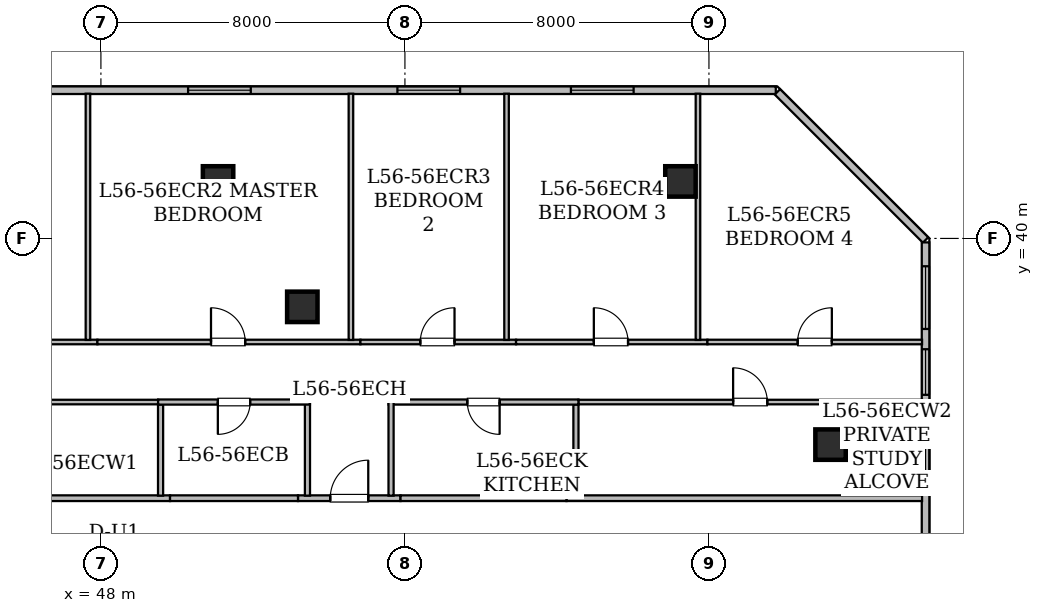
"""IFC4 building model, lengths in metres.
Left out: names, types, materials, properties, quantities, classifications, styles, units other than length and angle.
Written with IfcOpenShell. Run it as: python <this file> out.ifc"""

import sys

from ifc_helpers import new_model, si_unit, direction, frame, frame_2d, origin, origin_2d, place, context, subcontext, project, spatial, rectangle, hollow_rectangle, extrude, element, fill, save


model = new_model("IFC4")
c1 = context("Model", 3, precision=1e-05, world=origin(), true_north=direction((0.0, 1.0)))
c2 = subcontext(c1, "Body", "Model", "MODEL_VIEW")
j1 = project(units=[si_unit("LENGTHUNIT", "METRE"), si_unit("PLANEANGLEUNIT", "RADIAN")], contexts=[c1])
p1 = place(None, origin())
s1 = spatial("IfcSite", under=j1, at=p1, CompositionType="ELEMENT")
p2 = place(p1, origin())
s2 = spatial("IfcBuilding", under=s1, at=p2, CompositionType="ELEMENT")
p3 = place(p2, frame((0.0, 0.0, 220.85)))
s3 = spatial("IfcBuildingStorey", under=s2, at=p3, CompositionType="ELEMENT", Elevation=220.85)
for number, where, z_axis, x_axis in (
    (1, (51.083, 41.5, 0.0), (0.0, 0.0, 1.0), (1.0, 0.0, 0.0)),
    (2, (63.25, 41.5, 0.0), (0.0, 0.0, 1.0), (1.0, 0.0, 0.0)),
    (3, (67.2, 34.575, 0.0), (0.0, 0.0, 1.0), (1.0, 0.0, 0.0)),
    (4, (53.3, 38.2, 0.0), (0.0, 0.0, 1.0), (1.0, 0.0, 0.0)),
):
    element("IfcColumn", number, at=place(p3, frame(where, z_axis=z_axis, x_axis=x_axis)), inside=s3, PredefinedType="COLUMN", context=c2, shape_type="SweptSolid", body=[
        extrude(hollow_rectangle(XDim=0.8, YDim=0.8, WallThickness=0.04, at=origin_2d()), origin(), (0.0, 0.0, 1.0), 3.65),
    ])
p4 = place(p3, frame((24.302, 43.9, 0.0), z_axis=(0.0, 0.0, 1.0), x_axis=(1.0, 0.0, 0.0)))
e5 = element("IfcWall", 5, at=p4, inside=s3, PredefinedType="STANDARD", context=c2, shape_type="SweptSolid", body=[
    extrude(rectangle(XDim=41.457, YDim=0.2, at=frame_2d((20.729, 0.0))), origin(), (0.0, 0.0, 1.0), 3.43),
])
p5 = place(p4, frame((0.584, 0.0, 0.85)))
e6 = element("IfcOpeningElement", 6, at=p5, cuts=e5, PredefinedType="OPENING", context=c2, shape_type="SweptSolid", body=[
    extrude(rectangle(XDim=1.65, YDim=1.55, at=frame_2d((0.825, 0.775))), frame((0.0, 0.11, 0.0), z_axis=(0.0, -1.0, 0.0), x_axis=(1.0, 0.0, 0.0)), (0.0, 0.0, 1.0), 0.22),
])
p6 = place(p4, frame((9.098, 0.0, 0.85)))
e7 = element("IfcOpeningElement", 7, at=p6, cuts=e5, PredefinedType="OPENING", context=c2, shape_type="SweptSolid", body=[
    extrude(rectangle(XDim=1.65, YDim=1.55, at=frame_2d((0.825, 0.775))), frame((0.0, 0.11, 0.0), z_axis=(0.0, -1.0, 0.0), x_axis=(1.0, 0.0, 0.0)), (0.0, 0.0, 1.0), 0.22),
])
p7 = place(p4, frame((14.405, 0.0, 0.85)))
e8 = element("IfcOpeningElement", 8, at=p7, cuts=e5, PredefinedType="OPENING", context=c2, shape_type="SweptSolid", body=[
    extrude(rectangle(XDim=1.65, YDim=1.55, at=frame_2d((0.825, 0.775))), frame((0.0, 0.11, 0.0), z_axis=(0.0, -1.0, 0.0), x_axis=(1.0, 0.0, 0.0)), (0.0, 0.0, 1.0), 0.22),
])
p8 = place(p4, frame((19.51, 0.0, 0.85)))
e9 = element("IfcOpeningElement", 9, at=p8, cuts=e5, PredefinedType="OPENING", context=c2, shape_type="SweptSolid", body=[
    extrude(rectangle(XDim=1.65, YDim=1.55, at=frame_2d((0.825, 0.775))), frame((0.0, 0.11, 0.0), z_axis=(0.0, -1.0, 0.0), x_axis=(1.0, 0.0, 0.0)), (0.0, 0.0, 1.0), 0.22),
])
p9 = place(p4, frame((25.992, 0.0, 0.85)))
e10 = element("IfcOpeningElement", 10, at=p9, cuts=e5, PredefinedType="OPENING", context=c2, shape_type="SweptSolid", body=[
    extrude(rectangle(XDim=1.65, YDim=1.55, at=frame_2d((0.825, 0.775))), frame((0.0, 0.11, 0.0), z_axis=(0.0, -1.0, 0.0), x_axis=(1.0, 0.0, 0.0)), (0.0, 0.0, 1.0), 0.22),
])
p10 = place(p4, frame((31.5, 0.0, 0.85)))
e11 = element("IfcOpeningElement", 11, at=p10, cuts=e5, PredefinedType="OPENING", context=c2, shape_type="SweptSolid", body=[
    extrude(rectangle(XDim=1.65, YDim=1.55, at=frame_2d((0.825, 0.775))), frame((0.0, 0.11, 0.0), z_axis=(0.0, -1.0, 0.0), x_axis=(1.0, 0.0, 0.0)), (0.0, 0.0, 1.0), 0.22),
])
p11 = place(p4, frame((36.066, 0.0, 0.85)))
e12 = element("IfcOpeningElement", 12, at=p11, cuts=e5, PredefinedType="OPENING", context=c2, shape_type="SweptSolid", body=[
    extrude(rectangle(XDim=1.65, YDim=1.55, at=frame_2d((0.825, 0.775))), frame((0.0, 0.11, 0.0), z_axis=(0.0, -1.0, 0.0), x_axis=(1.0, 0.0, 0.0)), (0.0, 0.0, 1.0), 0.22),
])
p12 = place(p3, frame((65.802, 43.857, 0.0), z_axis=(0.0, 0.0, 1.0), x_axis=(0.707106781187, -0.707106781187, 0.0)))
e13 = element("IfcWall", 13, at=p12, inside=s3, PredefinedType="STANDARD", context=c2, shape_type="SweptSolid", body=[
    extrude(rectangle(XDim=5.512, YDim=0.2, at=frame_2d((2.756, 0.0))), origin(), (0.0, 0.0, 1.0), 3.43),
])
p13 = place(p3, frame((69.7, 39.896, 0.0), z_axis=(0.0, 0.0, 1.0), x_axis=(0.0, -1.0, 0.0)))
e14 = element("IfcWall", 14, at=p13, inside=s3, PredefinedType="STANDARD", context=c2, shape_type="SweptSolid", body=[
    extrude(rectangle(XDim=8.863, YDim=0.2, at=frame_2d((4.432, 0.0))), origin(), (0.0, 0.0, 1.0), 3.43),
])
p14 = place(p13, frame((4.641, 0.0, 0.85)))
e15 = element("IfcOpeningElement", 15, at=p14, cuts=e14, PredefinedType="OPENING", context=c2, shape_type="SweptSolid", body=[
    extrude(rectangle(XDim=1.65, YDim=1.55, at=frame_2d((0.825, 0.775))), frame((0.0, 0.11, 0.0), z_axis=(0.0, -1.0, 0.0), x_axis=(1.0, 0.0, 0.0)), (0.0, 0.0, 1.0), 0.22),
])
p15 = place(p13, frame((2.811, 0.0, 0.8)))
e16 = element("IfcOpeningElement", 16, at=p15, cuts=e14, PredefinedType="OPENING", context=c2, shape_type="SweptSolid", body=[
    extrude(rectangle(XDim=1.2, YDim=1.5, at=frame_2d((0.6, 0.75))), frame((0.0, 0.11, 0.0), z_axis=(0.0, -1.0, 0.0), x_axis=(1.0, 0.0, 0.0)), (0.0, 0.0, 1.0), 0.22),
])
p16 = place(p13, frame((0.628, 0.0, 0.85)))
e17 = element("IfcOpeningElement", 17, at=p16, cuts=e14, PredefinedType="OPENING", context=c2, shape_type="SweptSolid", body=[
    extrude(rectangle(XDim=1.65, YDim=1.55, at=frame_2d((0.825, 0.775))), frame((0.0, 0.11, 0.0), z_axis=(0.0, -1.0, 0.0), x_axis=(1.0, 0.0, 0.0)), (0.0, 0.0, 1.0), 0.22),
])
p17 = place(p3, frame((41.55, 33.165, 0.0), z_axis=(0.0, 0.0, 1.0), x_axis=(1.0, 0.0, 0.0)))
e18 = element("IfcWall", 18, at=p17, inside=s3, PredefinedType="STANDARD", context=c2, shape_type="SweptSolid", body=[
    extrude(rectangle(XDim=8.269, YDim=0.15, at=frame_2d((4.135, 0.0))), origin(), (0.0, 0.0, 1.0), 3.065),
])
p18 = place(p3, frame((60.251, 33.165, 0.0), z_axis=(0.0, 0.0, 1.0), x_axis=(1.0, 0.0, 0.0)))
e19 = element("IfcWall", 19, at=p18, inside=s3, PredefinedType="STANDARD", context=c2, shape_type="SweptSolid", body=[
    extrude(rectangle(XDim=9.357, YDim=0.15, at=frame_2d((4.678, 0.0))), origin(), (0.0, 0.0, 1.0), 2.887),
])
p19 = place(p3, frame((53.186, 33.165, 0.0), z_axis=(0.0, 0.0, 1.0), x_axis=(1.0, 0.0, 0.0)))
e20 = element("IfcWall", 20, at=p19, inside=s3, PredefinedType="STANDARD", context=c2, shape_type="SweptSolid", body=[
    extrude(rectangle(XDim=2.698, YDim=0.15, at=frame_2d((1.349, 0.0))), origin(), (0.0, 0.0, 1.0), 2.725),
])
p20 = place(p19, frame((0.849, 0.0, 0.0)))
e21 = element("IfcOpeningElement", 21, at=p20, cuts=e20, PredefinedType="OPENING", context=c2, shape_type="SweptSolid", body=[
    extrude(rectangle(XDim=1.0, YDim=2.15, at=frame_2d((0.5, 1.075))), frame((0.0, 0.085, 0.0), z_axis=(0.0, -1.0, 0.0), x_axis=(1.0, 0.0, 0.0)), (0.0, 0.0, 1.0), 0.17),
])
p21 = place(p3, frame((49.819, 33.165, 0.0), z_axis=(0.0, 0.0, 1.0), x_axis=(1.0, 0.0, 0.0)))
e22 = element("IfcWall", 22, at=p21, inside=s3, PredefinedType="STANDARD", context=c2, shape_type="SweptSolid", body=[
    extrude(rectangle(XDim=3.367, YDim=0.15, at=frame_2d((1.684, 0.0))), origin(), (0.0, 0.0, 1.0), 2.725),
])
p22 = place(p3, frame((55.884, 33.165, 0.0), z_axis=(0.0, 0.0, 1.0), x_axis=(1.0, 0.0, 0.0)))
e23 = element("IfcWall", 23, at=p22, inside=s3, PredefinedType="STANDARD", context=c2, shape_type="SweptSolid", body=[
    extrude(rectangle(XDim=4.367, YDim=0.15, at=frame_2d((2.184, 0.0))), origin(), (0.0, 0.0, 1.0), 3.065),
])
p23 = place(p3, frame((41.682, 35.695, 0.0), z_axis=(0.0, 0.0, 1.0), x_axis=(1.0, 0.0, 0.0)))
e24 = element("IfcWall", 24, at=p23, inside=s3, PredefinedType="PARTITIONING", context=c2, shape_type="SweptSolid", body=[
    extrude(rectangle(XDim=7.823, YDim=0.12, at=frame_2d((3.912, 0.0))), origin(), (0.0, 0.0, 1.0), 3.43),
])
p24 = place(p23, frame((3.462, 0.0, 0.0)))
e25 = element("IfcOpeningElement", 25, at=p24, cuts=e24, PredefinedType="OPENING", context=c2, shape_type="SweptSolid", body=[
    extrude(rectangle(XDim=0.9, YDim=2.1, at=frame_2d((0.45, 1.05))), frame((0.0, 0.07, 0.0), z_axis=(0.0, -1.0, 0.0), x_axis=(1.0, 0.0, 0.0)), (0.0, 0.0, 1.0), 0.14),
])
p25 = place(p3, frame((49.57, 35.63, 0.0), z_axis=(0.0, 0.0, 1.0), x_axis=(0.0, -1.0, 0.0)))
e26 = element("IfcWall", 26, at=p25, inside=s3, PredefinedType="PARTITIONING", context=c2, shape_type="SweptSolid", body=[
    extrude(rectangle(XDim=2.398, YDim=0.135, at=frame_2d((1.199, 0.0))), origin(), (0.0, 0.0, 1.0), 3.065),
])
p26 = place(p3, frame((60.565, 35.695, 0.0), z_axis=(0.0, 0.0, 1.0), x_axis=(1.0, 0.0, 0.0)))
e27 = element("IfcWall", 27, at=p26, inside=s3, PredefinedType="PARTITIONING", context=c2, shape_type="SweptSolid", body=[
    extrude(rectangle(XDim=9.043, YDim=0.12, at=frame_2d((4.521, 0.0))), origin(), (0.0, 0.0, 1.0), 2.725),
])
p27 = place(p26, frame((4.071, 0.0, 0.0)))
e28 = element("IfcOpeningElement", 28, at=p27, cuts=e27, PredefinedType="OPENING", context=c2, shape_type="SweptSolid", body=[
    extrude(rectangle(XDim=0.9, YDim=2.1, at=frame_2d((0.45, 1.05))), frame((0.0, 0.07, 0.0), z_axis=(0.0, -1.0, 0.0), x_axis=(1.0, 0.0, 0.0)), (0.0, 0.0, 1.0), 0.14),
])
p28 = place(p3, frame((60.5, 33.232, 0.0), z_axis=(0.0, 0.0, 1.0), x_axis=(0.0, 1.0, 0.0)))
e29 = element("IfcWall", 29, at=p28, inside=s3, PredefinedType="PARTITIONING", context=c2, shape_type="SweptSolid", body=[
    extrude(rectangle(XDim=2.398, YDim=0.135, at=frame_2d((1.199, 0.0))), origin(), (0.0, 0.0, 1.0), 3.065),
])
p29 = place(p3, frame((53.435, 33.232, 0.0), z_axis=(0.0, 0.0, 1.0), x_axis=(0.0, 1.0, 0.0)))
e30 = element("IfcWall", 30, at=p29, inside=s3, PredefinedType="PARTITIONING", context=c2, shape_type="SweptSolid", body=[
    extrude(rectangle(XDim=2.528, YDim=0.135, at=frame_2d((1.264, 0.0))), origin(), (0.0, 0.0, 1.0), 2.725),
])
p30 = place(p3, frame((53.5, 35.695, 0.0), z_axis=(0.0, 0.0, 1.0), x_axis=(-1.0, 0.0, 0.0)))
e31 = element("IfcWall", 31, at=p30, inside=s3, PredefinedType="PARTITIONING", context=c2, shape_type="SweptSolid", body=[
    extrude(rectangle(XDim=3.995, YDim=0.135, at=frame_2d((1.998, 0.0))), origin(), (0.0, 0.0, 1.0), 2.725),
])
p31 = place(p30, frame((1.573, 0.0, 0.0)))
e32 = element("IfcOpeningElement", 32, at=p31, cuts=e31, PredefinedType="OPENING", context=c2, shape_type="SweptSolid", body=[
    extrude(rectangle(XDim=0.85, YDim=2.1, at=frame_2d((0.425, 1.05))), frame((0.0, 0.077, 0.0), z_axis=(0.0, -1.0, 0.0), x_axis=(1.0, 0.0, 0.0)), (0.0, 0.0, 1.0), 0.155),
])
p32 = place(p3, frame((60.565, 35.695, 0.0), z_axis=(0.0, 0.0, 1.0), x_axis=(-1.0, 0.0, 0.0)))
e33 = element("IfcWall", 33, at=p32, inside=s3, PredefinedType="PARTITIONING", context=c2, shape_type="SweptSolid", body=[
    extrude(rectangle(XDim=4.995, YDim=0.135, at=frame_2d((2.498, 0.0))), origin(), (0.0, 0.0, 1.0), 3.43),
])
p33 = place(p32, frame((2.073, 0.0, 0.0)))
e34 = element("IfcOpeningElement", 34, at=p33, cuts=e33, PredefinedType="OPENING", context=c2, shape_type="SweptSolid", body=[
    extrude(rectangle(XDim=0.85, YDim=2.1, at=frame_2d((0.425, 1.05))), frame((0.0, 0.077, 0.0), z_axis=(0.0, -1.0, 0.0), x_axis=(1.0, 0.0, 0.0)), (0.0, 0.0, 1.0), 0.155),
])
p34 = place(p3, frame((55.635, 35.76, 0.0), z_axis=(0.0, 0.0, 1.0), x_axis=(0.0, -1.0, 0.0)))
e35 = element("IfcWall", 35, at=p34, inside=s3, PredefinedType="PARTITIONING", context=c2, shape_type="SweptSolid", body=[
    extrude(rectangle(XDim=2.528, YDim=0.135, at=frame_2d((1.264, 0.0))), origin(), (0.0, 0.0, 1.0), 3.065),
])
p35 = place(p3, frame((41.682, 37.275, 0.0), z_axis=(0.0, 0.0, 1.0), x_axis=(1.0, 0.0, 0.0)))
e36 = element("IfcWall", 36, at=p35, inside=s3, PredefinedType="PARTITIONING", context=c2, shape_type="SweptSolid", body=[
    extrude(rectangle(XDim=6.226, YDim=0.12, at=frame_2d((3.113, 0.0))), origin(), (0.0, 0.0, 1.0), 2.725),
])
p36 = place(p35, frame((2.642, 0.0, 0.0)))
e37 = element("IfcOpeningElement", 37, at=p36, cuts=e36, PredefinedType="OPENING", context=c2, shape_type="SweptSolid", body=[
    extrude(rectangle(XDim=0.9, YDim=2.1, at=frame_2d((0.45, 1.05))), frame((0.0, 0.07, 0.0), z_axis=(0.0, -1.0, 0.0), x_axis=(1.0, 0.0, 0.0)), (0.0, 0.0, 1.0), 0.14),
])
p37 = place(p3, frame((47.908, 37.275, 0.0), z_axis=(0.0, 0.0, 1.0), x_axis=(1.0, 0.0, 0.0)))
e38 = element("IfcWall", 38, at=p37, inside=s3, PredefinedType="PARTITIONING", context=c2, shape_type="SweptSolid", body=[
    extrude(rectangle(XDim=6.921, YDim=0.12, at=frame_2d((3.46, 0.0))), origin(), (0.0, 0.0, 1.0), 2.725),
])
p38 = place(p37, frame((2.989, 0.0, 0.0)))
e39 = element("IfcOpeningElement", 39, at=p38, cuts=e38, PredefinedType="OPENING", context=c2, shape_type="SweptSolid", body=[
    extrude(rectangle(XDim=0.9, YDim=2.1, at=frame_2d((0.45, 1.05))), frame((0.0, 0.07, 0.0), z_axis=(0.0, -1.0, 0.0), x_axis=(1.0, 0.0, 0.0)), (0.0, 0.0, 1.0), 0.14),
])
p39 = place(p3, frame((54.829, 37.275, 0.0), z_axis=(0.0, 0.0, 1.0), x_axis=(1.0, 0.0, 0.0)))
e40 = element("IfcWall", 40, at=p39, inside=s3, PredefinedType="PARTITIONING", context=c2, shape_type="SweptSolid", body=[
    extrude(rectangle(XDim=4.095, YDim=0.12, at=frame_2d((2.047, 0.0))), origin(), (0.0, 0.0, 1.0), 2.725),
])
p40 = place(p39, frame((1.576, 0.0, 0.0)))
e41 = element("IfcOpeningElement", 41, at=p40, cuts=e40, PredefinedType="OPENING", context=c2, shape_type="SweptSolid", body=[
    extrude(rectangle(XDim=0.9, YDim=2.1, at=frame_2d((0.45, 1.05))), frame((0.0, 0.07, 0.0), z_axis=(0.0, -1.0, 0.0), x_axis=(1.0, 0.0, 0.0)), (0.0, 0.0, 1.0), 0.14),
])
p41 = place(p3, frame((58.924, 37.275, 0.0), z_axis=(0.0, 0.0, 1.0), x_axis=(1.0, 0.0, 0.0)))
e42 = element("IfcWall", 42, at=p41, inside=s3, PredefinedType="PARTITIONING", context=c2, shape_type="SweptSolid", body=[
    extrude(rectangle(XDim=5.036, YDim=0.12, at=frame_2d((2.518, 0.0))), origin(), (0.0, 0.0, 1.0), 3.43),
])
p42 = place(p41, frame((2.047, 0.0, 0.0)))
e43 = element("IfcOpeningElement", 43, at=p42, cuts=e42, PredefinedType="OPENING", context=c2, shape_type="SweptSolid", body=[
    extrude(rectangle(XDim=0.9, YDim=2.1, at=frame_2d((0.45, 1.05))), frame((0.0, 0.07, 0.0), z_axis=(0.0, -1.0, 0.0), x_axis=(1.0, 0.0, 0.0)), (0.0, 0.0, 1.0), 0.14),
])
p43 = place(p3, frame((63.96, 37.275, 0.0), z_axis=(0.0, 0.0, 1.0), x_axis=(1.0, 0.0, 0.0)))
e44 = element("IfcWall", 44, at=p43, inside=s3, PredefinedType="PARTITIONING", context=c2, shape_type="SweptSolid", body=[
    extrude(rectangle(XDim=5.648, YDim=0.12, at=frame_2d((2.824, 0.0))), origin(), (0.0, 0.0, 1.0), 2.887),
])
p44 = place(p43, frame((2.374, 0.0, 0.0)))
e45 = element("IfcOpeningElement", 45, at=p44, cuts=e44, PredefinedType="OPENING", context=c2, shape_type="SweptSolid", body=[
    extrude(rectangle(XDim=0.9, YDim=2.1, at=frame_2d((0.45, 1.05))), frame((0.0, 0.07, 0.0), z_axis=(0.0, -1.0, 0.0), x_axis=(1.0, 0.0, 0.0)), (0.0, 0.0, 1.0), 0.14),
])
for number, where, z_axis, x_axis in (
    (46, (47.659, 43.808, 0.0), (0.0, 0.0, 1.0), (0.0, -1.0, 0.0)),
    (47, (54.579, 43.808, 0.0), (0.0, 0.0, 1.0), (0.0, -1.0, 0.0)),
    (48, (58.674, 43.808, 0.0), (0.0, 0.0, 1.0), (0.0, -1.0, 0.0)),
):
    element("IfcWall", number, at=place(p3, frame(where, z_axis=z_axis, x_axis=x_axis)), inside=s3, PredefinedType="PARTITIONING", context=c2, shape_type="SweptSolid", body=[
        extrude(rectangle(XDim=6.479, YDim=0.12, at=frame_2d((3.24, 0.0))), origin(), (0.0, 0.0, 1.0), 2.725),
    ])
p45 = place(p3, frame((63.711, 43.808, 0.0), z_axis=(0.0, 0.0, 1.0), x_axis=(0.0, -1.0, 0.0)))
e49 = element("IfcWall", 49, at=p45, inside=s3, PredefinedType="PARTITIONING", context=c2, shape_type="SweptSolid", body=[
    extrude(rectangle(XDim=6.479, YDim=0.12, at=frame_2d((3.24, 0.0))), origin(), (0.0, 0.0, 1.0), 2.887),
])
p46 = place(p14, origin())
e50 = element("IfcWindow", 50, at=p46, inside=s3, PartitioningType="SINGLE_PANEL", PredefinedType="WINDOW", context=c2, shape_type="SweptSolid", body=[
    extrude(rectangle(XDim=1.65, YDim=1.55, at=frame_2d((0.825, 0.775))), frame((0.0, 0.03, 0.0), z_axis=(0.0, -1.0, 0.0), x_axis=(1.0, 0.0, 0.0)), (0.0, 0.0, 1.0), 0.06),
])
fill(e15, e50)
p47 = place(p15, origin())
e51 = element("IfcWindow", 51, at=p47, inside=s3, PartitioningType="SINGLE_PANEL", PredefinedType="WINDOW", context=c2, shape_type="SweptSolid", body=[
    extrude(rectangle(XDim=1.2, YDim=1.5, at=frame_2d((0.6, 0.75))), frame((0.0, 0.03, 0.0), z_axis=(0.0, -1.0, 0.0), x_axis=(1.0, 0.0, 0.0)), (0.0, 0.0, 1.0), 0.06),
])
fill(e16, e51)
p48 = place(p9, origin())
e52 = element("IfcWindow", 52, at=p48, inside=s3, PartitioningType="SINGLE_PANEL", PredefinedType="WINDOW", context=c2, shape_type="SweptSolid", body=[
    extrude(rectangle(XDim=1.65, YDim=1.55, at=frame_2d((0.825, 0.775))), frame((0.0, 0.03, 0.0), z_axis=(0.0, -1.0, 0.0), x_axis=(1.0, 0.0, 0.0)), (0.0, 0.0, 1.0), 0.06),
])
fill(e10, e52)
p49 = place(p10, origin())
e53 = element("IfcWindow", 53, at=p49, inside=s3, PartitioningType="SINGLE_PANEL", PredefinedType="WINDOW", context=c2, shape_type="SweptSolid", body=[
    extrude(rectangle(XDim=1.65, YDim=1.55, at=frame_2d((0.825, 0.775))), frame((0.0, 0.03, 0.0), z_axis=(0.0, -1.0, 0.0), x_axis=(1.0, 0.0, 0.0)), (0.0, 0.0, 1.0), 0.06),
])
fill(e11, e53)
p50 = place(p11, origin())
e54 = element("IfcWindow", 54, at=p50, inside=s3, PartitioningType="SINGLE_PANEL", PredefinedType="WINDOW", context=c2, shape_type="SweptSolid", body=[
    extrude(rectangle(XDim=1.65, YDim=1.55, at=frame_2d((0.825, 0.775))), frame((0.0, 0.03, 0.0), z_axis=(0.0, -1.0, 0.0), x_axis=(1.0, 0.0, 0.0)), (0.0, 0.0, 1.0), 0.06),
])
fill(e12, e54)
p51 = place(p16, origin())
e55 = element("IfcWindow", 55, at=p51, inside=s3, PartitioningType="SINGLE_PANEL", PredefinedType="WINDOW", context=c2, shape_type="SweptSolid", body=[
    extrude(rectangle(XDim=1.65, YDim=1.55, at=frame_2d((0.825, 0.775))), frame((0.0, 0.03, 0.0), z_axis=(0.0, -1.0, 0.0), x_axis=(1.0, 0.0, 0.0)), (0.0, 0.0, 1.0), 0.06),
])
fill(e17, e55)
p52 = place(p20, origin())
e56 = element("IfcDoor", 56, at=p52, inside=s3, OperationType="SINGLE_SWING_RIGHT", PredefinedType="DOOR", context=c2, shape_type="SweptSolid", body=[
    extrude(rectangle(XDim=1.0, YDim=2.15, at=frame_2d((0.5, 1.075))), frame((0.0, 0.025, 0.0), z_axis=(0.0, -1.0, 0.0), x_axis=(1.0, 0.0, 0.0)), (0.0, 0.0, 1.0), 0.05),
])
fill(e21, e56)
p53 = place(p27, origin())
e57 = element("IfcDoor", 57, at=p53, inside=s3, OperationType="SINGLE_SWING_LEFT", PredefinedType="DOOR", context=c2, shape_type="SweptSolid", body=[
    extrude(rectangle(XDim=0.9, YDim=2.1, at=frame_2d((0.45, 1.05))), frame((0.0, 0.025, 0.0), z_axis=(0.0, -1.0, 0.0), x_axis=(1.0, 0.0, 0.0)), (0.0, 0.0, 1.0), 0.05),
])
fill(e28, e57)
p54 = place(p31, origin())
e58 = element("IfcDoor", 58, at=p54, inside=s3, OperationType="SINGLE_SWING_RIGHT", PredefinedType="DOOR", context=c2, shape_type="SweptSolid", body=[
    extrude(rectangle(XDim=0.85, YDim=2.1, at=frame_2d((0.425, 1.05))), frame((0.0, 0.025, 0.0), z_axis=(0.0, -1.0, 0.0), x_axis=(1.0, 0.0, 0.0)), (0.0, 0.0, 1.0), 0.05),
])
fill(e32, e58)
p55 = place(p33, origin())
e59 = element("IfcDoor", 59, at=p55, inside=s3, OperationType="SINGLE_SWING_LEFT", PredefinedType="DOOR", context=c2, shape_type="SweptSolid", body=[
    extrude(rectangle(XDim=0.85, YDim=2.1, at=frame_2d((0.425, 1.05))), frame((0.0, 0.025, 0.0), z_axis=(0.0, -1.0, 0.0), x_axis=(1.0, 0.0, 0.0)), (0.0, 0.0, 1.0), 0.05),
])
fill(e34, e59)
p56 = place(p38, origin())
e60 = element("IfcDoor", 60, at=p56, inside=s3, OperationType="SINGLE_SWING_LEFT", PredefinedType="DOOR", context=c2, shape_type="SweptSolid", body=[
    extrude(rectangle(XDim=0.9, YDim=2.1, at=frame_2d((0.45, 1.05))), frame((0.0, 0.025, 0.0), z_axis=(0.0, -1.0, 0.0), x_axis=(1.0, 0.0, 0.0)), (0.0, 0.0, 1.0), 0.05),
])
fill(e39, e60)
p57 = place(p40, origin())
e61 = element("IfcDoor", 61, at=p57, inside=s3, OperationType="SINGLE_SWING_RIGHT", PredefinedType="DOOR", context=c2, shape_type="SweptSolid", body=[
    extrude(rectangle(XDim=0.9, YDim=2.1, at=frame_2d((0.45, 1.05))), frame((0.0, 0.025, 0.0), z_axis=(0.0, -1.0, 0.0), x_axis=(1.0, 0.0, 0.0)), (0.0, 0.0, 1.0), 0.05),
])
fill(e41, e61)
p58 = place(p42, origin())
e62 = element("IfcDoor", 62, at=p58, inside=s3, OperationType="SINGLE_SWING_LEFT", PredefinedType="DOOR", context=c2, shape_type="SweptSolid", body=[
    extrude(rectangle(XDim=0.9, YDim=2.1, at=frame_2d((0.45, 1.05))), frame((0.0, 0.025, 0.0), z_axis=(0.0, -1.0, 0.0), x_axis=(1.0, 0.0, 0.0)), (0.0, 0.0, 1.0), 0.05),
])
fill(e43, e62)
p59 = place(p44, origin())
e63 = element("IfcDoor", 63, at=p59, inside=s3, OperationType="SINGLE_SWING_RIGHT", PredefinedType="DOOR", context=c2, shape_type="SweptSolid", body=[
    extrude(rectangle(XDim=0.9, YDim=2.1, at=frame_2d((0.45, 1.05))), frame((0.0, 0.025, 0.0), z_axis=(0.0, -1.0, 0.0), x_axis=(1.0, 0.0, 0.0)), (0.0, 0.0, 1.0), 0.05),
])
fill(e45, e63)
save(model, sys.argv[1])
